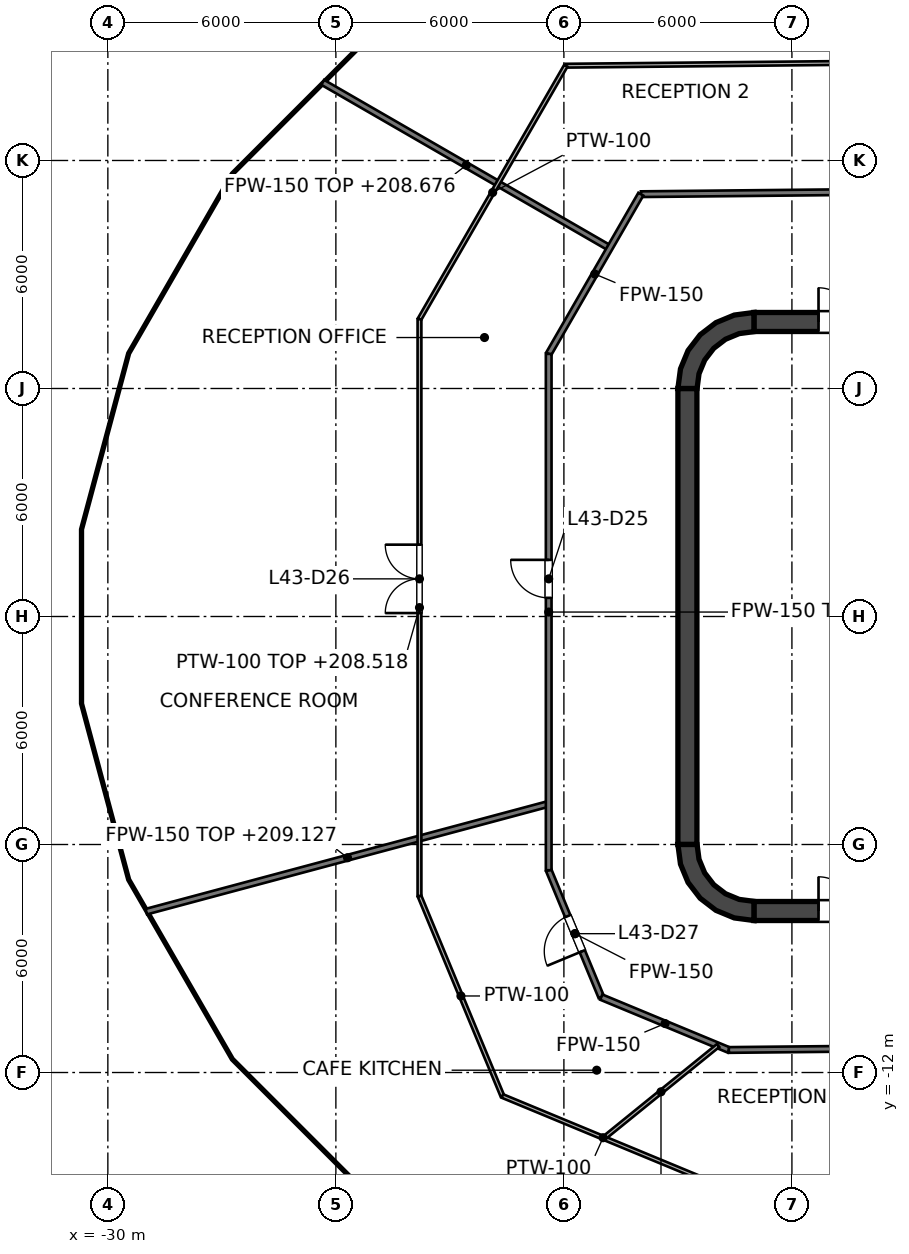
"""IFC4 building model, lengths in metres.
Left out: names, types, materials, properties, quantities, classifications, styles, units other than length and angle.
Written with IfcOpenShell. Run it as: python <this file> out.ifc"""

import sys

from ifc_helpers import new_model, si_unit, direction, frame, frame_2d, origin, place, context, subcontext, project, spatial, polyline, rectangle, outline, extrude, element, fill, save


model = new_model("IFC4")
c1 = context("Model", 3, precision=1e-05, world=origin(), true_north=direction((0.0, 1.0)))
c2 = subcontext(c1, "Body", "Model", "MODEL_VIEW")
j1 = project(units=[si_unit("LENGTHUNIT", "METRE"), si_unit("PLANEANGLEUNIT", "RADIAN")], contexts=[c1])
p1 = place(None, origin())
s1 = spatial("IfcSite", under=j1, at=p1, CompositionType="ELEMENT")
p2 = place(p1, origin())
s2 = spatial("IfcBuilding", under=s1, at=p2, CompositionType="ELEMENT")
p3 = place(p2, frame((0.0, 0.0, 203.0)))
s3 = spatial("IfcBuildingStorey", under=s2, at=p3, CompositionType="ELEMENT", Elevation=203.0)
p4 = place(p3, frame((-13.0, 7.75, 0.0), z_axis=(0.0, 0.0, 1.0), x_axis=(1.0, 0.0, 0.0)))
e1 = element("IfcWall", 1, at=p4, inside=s3, PredefinedType="SHEAR", context=c2, shape_type="SweptSolid", body=[
    extrude(rectangle(XDim=26.0, YDim=0.5, at=frame_2d((13.0, 0.0))), origin(), (0.0, 0.0, 1.0), 6.45),
])
p5 = place(p4, frame((1.7, 0.0, 0.0)))
e2 = element("IfcOpeningElement", 2, at=p5, cuts=e1, PredefinedType="OPENING", context=c2, shape_type="SweptSolid", body=[
    extrude(rectangle(XDim=1.8, YDim=2.1, at=frame_2d((0.9, 1.05))), frame((0.0, 0.25, 0.0), z_axis=(0.0, -1.0, 0.0), x_axis=(1.0, 0.0, 0.0)), (0.0, 0.0, 1.0), 0.5),
])
p6 = place(p4, frame((22.5, 0.0, 0.0)))
e3 = element("IfcOpeningElement", 3, at=p6, cuts=e1, PredefinedType="OPENING", context=c2, shape_type="SweptSolid", body=[
    extrude(rectangle(XDim=1.8, YDim=2.1, at=frame_2d((0.9, 1.05))), frame((0.0, 0.25, 0.0), z_axis=(0.0, -1.0, 0.0), x_axis=(1.0, 0.0, 0.0)), (0.0, 0.0, 1.0), 0.5),
])
p7 = place(p3, frame((-13.0, -7.75, 0.0), z_axis=(0.0, 0.0, 1.0), x_axis=(1.0, 0.0, 0.0)))
e4 = element("IfcWall", 4, at=p7, inside=s3, PredefinedType="SHEAR", context=c2, shape_type="SweptSolid", body=[
    extrude(rectangle(XDim=26.0, YDim=0.5, at=frame_2d((13.0, 0.0))), origin(), (0.0, 0.0, 1.0), 6.45),
])
p8 = place(p7, frame((1.7, 0.0, 0.0)))
e5 = element("IfcOpeningElement", 5, at=p8, cuts=e4, PredefinedType="OPENING", context=c2, shape_type="SweptSolid", body=[
    extrude(rectangle(XDim=1.8, YDim=2.1, at=frame_2d((0.9, 1.05))), frame((0.0, 0.25, 0.0), z_axis=(0.0, -1.0, 0.0), x_axis=(1.0, 0.0, 0.0)), (0.0, 0.0, 1.0), 0.5),
])
p9 = place(p7, frame((22.5, 0.0, 0.0)))
e6 = element("IfcOpeningElement", 6, at=p9, cuts=e4, PredefinedType="OPENING", context=c2, shape_type="SweptSolid", body=[
    extrude(rectangle(XDim=1.8, YDim=2.1, at=frame_2d((0.9, 1.05))), frame((0.0, 0.25, 0.0), z_axis=(0.0, -1.0, 0.0), x_axis=(1.0, 0.0, 0.0)), (0.0, 0.0, 1.0), 0.5),
])
p10 = place(p3, frame((-14.75, -6.0, 0.0), z_axis=(0.0, 0.0, 1.0), x_axis=(0.0, 1.0, 0.0)))
e7 = element("IfcWall", 7, at=p10, inside=s3, PredefinedType="SHEAR", context=c2, shape_type="SweptSolid", body=[
    extrude(rectangle(XDim=12.0, YDim=0.5, at=frame_2d((6.0, 0.0))), origin(), (0.0, 0.0, 1.0), 6.45),
])
p11 = place(p3, origin())
e8 = element("IfcWall", 8, at=p11, inside=s3, PredefinedType="SHEAR", context=c2, shape_type="SweptSolid", body=[
    extrude(outline(polyline([(-15.0, 6.0), (-14.496, 6.0), (-14.445, 6.387), (-14.295, 6.748), (-14.058, 7.058), (-13.748, 7.295), (-13.387, 7.445), (-13.0, 7.496), (-13.0, 8.0), (-13.518, 7.932), (-14.0, 7.732), (-14.414, 7.414), (-14.732, 7.0), (-14.932, 6.518), (-15.0, 6.0)])), origin(), (0.0, 0.0, 1.0), 6.45),
])
e9 = element("IfcWall", 9, at=p11, inside=s3, PredefinedType="SHEAR", context=c2, shape_type="SweptSolid", body=[
    extrude(outline(polyline([(-13.0, -8.0), (-13.0, -7.496), (-13.387, -7.445), (-13.748, -7.295), (-14.058, -7.058), (-14.295, -6.748), (-14.445, -6.387), (-14.496, -6.0), (-15.0, -6.0), (-14.932, -6.518), (-14.732, -7.0), (-14.414, -7.414), (-14.0, -7.732), (-13.518, -7.932), (-13.0, -8.0)])), origin(), (0.0, 0.0, 1.0), 6.45),
])
p12 = place(p3, frame((-11.8, -7.5, 0.0), z_axis=(0.0, 0.0, 1.0), x_axis=(0.0, 1.0, 0.0)))
e10 = element("IfcWall", 10, at=p12, inside=s3, PredefinedType="SOLIDWALL", context=c2, shape_type="SweptSolid", body=[
    extrude(rectangle(XDim=15.0, YDim=0.4, at=frame_2d((7.5, 0.0))), origin(), (0.0, 0.0, 1.0), 5.7),
])
p13 = place(p12, frame((11.3, 0.0, 0.0)))
e11 = element("IfcOpeningElement", 11, at=p13, cuts=e10, PredefinedType="OPENING", context=c2, shape_type="SweptSolid", body=[
    extrude(rectangle(XDim=1.1, YDim=2.1, at=frame_2d((0.55, 1.05))), frame((0.0, 0.2, 0.0), z_axis=(0.0, -1.0, 0.0), x_axis=(1.0, 0.0, 0.0)), (0.0, 0.0, 1.0), 0.4),
])
p14 = place(p12, frame((8.4, 0.0, 0.0)))
e12 = element("IfcOpeningElement", 12, at=p14, cuts=e10, PredefinedType="OPENING", context=c2, shape_type="SweptSolid", body=[
    extrude(rectangle(XDim=1.1, YDim=2.1, at=frame_2d((0.55, 1.05))), frame((0.0, 0.2, 0.0), z_axis=(0.0, -1.0, 0.0), x_axis=(1.0, 0.0, 0.0)), (0.0, 0.0, 1.0), 0.4),
])
p15 = place(p12, frame((5.5, 0.0, 0.0)))
e13 = element("IfcOpeningElement", 13, at=p15, cuts=e10, PredefinedType="OPENING", context=c2, shape_type="SweptSolid", body=[
    extrude(rectangle(XDim=1.1, YDim=2.1, at=frame_2d((0.55, 1.05))), frame((0.0, 0.2, 0.0), z_axis=(0.0, -1.0, 0.0), x_axis=(1.0, 0.0, 0.0)), (0.0, 0.0, 1.0), 0.4),
])
p16 = place(p12, frame((2.6, 0.0, 0.0)))
e14 = element("IfcOpeningElement", 14, at=p16, cuts=e10, PredefinedType="OPENING", context=c2, shape_type="SweptSolid", body=[
    extrude(rectangle(XDim=1.1, YDim=2.1, at=frame_2d((0.55, 1.05))), frame((0.0, 0.2, 0.0), z_axis=(0.0, -1.0, 0.0), x_axis=(1.0, 0.0, 0.0)), (0.0, 0.0, 1.0), 0.4),
])
p17 = place(p12, frame((13.697, 0.0, 0.0)))
e15 = element("IfcOpeningElement", 15, at=p17, cuts=e10, PredefinedType="OPENING", context=c2, shape_type="SweptSolid", body=[
    extrude(rectangle(XDim=0.9, YDim=2.1, at=frame_2d((0.45, 1.05))), frame((0.0, 0.2, 0.0), z_axis=(0.0, -1.0, 0.0), x_axis=(1.0, 0.0, 0.0)), (0.0, 0.0, 1.0), 0.4),
])
p18 = place(p12, frame((0.403, 0.0, 0.0)))
e16 = element("IfcOpeningElement", 16, at=p18, cuts=e10, PredefinedType="OPENING", context=c2, shape_type="SweptSolid", body=[
    extrude(rectangle(XDim=0.9, YDim=2.1, at=frame_2d((0.45, 1.05))), frame((0.0, 0.2, 0.0), z_axis=(0.0, -1.0, 0.0), x_axis=(1.0, 0.0, 0.0)), (0.0, 0.0, 1.0), 0.4),
])
e17 = element("IfcWall", 17, at=p11, inside=s3, PredefinedType="SOLIDWALL", context=c2, shape_type="SweptSolid", body=[
    extrude(outline(polyline([(-12.0, -5.925), (-12.0, -5.675), (-14.25, -5.675), (-14.25, -3.025), (-12.0, -3.025), (-12.0, -2.775), (-14.25, -2.775), (-14.25, -0.125), (-12.0, -0.125), (-12.0, 0.125), (-14.25, 0.125), (-14.25, 2.775), (-12.0, 2.775), (-12.0, 3.025), (-14.25, 3.025), (-14.25, 5.675), (-12.0, 5.675), (-12.0, 5.925), (-14.25, 5.925), (-14.5, 5.925), (-14.5, 5.675), (-14.5, 3.025), (-14.5, 2.775), (-14.5, 0.125), (-14.5, -0.125), (-14.5, -2.775), (-14.5, -3.025), (-14.5, -5.675), (-14.5, -5.925), (-14.25, -5.925), (-12.0, -5.925)])), origin(), (0.0, 0.0, 1.0), 5.7),
])
p19 = place(p3, frame((-18.4, -6.677, 0.0), z_axis=(0.0, 0.0, 1.0), x_axis=(0.382844919445, -0.923812625837, 0.0)))
e18 = element("IfcWall", 18, at=p19, inside=s3, PredefinedType="PARTITIONING", context=c2, shape_type="SweptSolid", body=[
    extrude(rectangle(XDim=3.615, YDim=0.15, at=frame_2d((1.807, 0.0))), origin(), (0.0, 0.0, 1.0), 5.527),
])
p20 = place(p19, frame((1.307, 0.0, 0.0)))
e19 = element("IfcOpeningElement", 19, at=p20, cuts=e18, PredefinedType="OPENING", context=c2, shape_type="SweptSolid", body=[
    extrude(rectangle(XDim=1.0, YDim=2.1, at=frame_2d((0.5, 1.05))), frame((0.0, 0.075, 0.0), z_axis=(0.0, -1.0, 0.0), x_axis=(1.0, 0.0, 0.0)), (0.0, 0.0, 1.0), 0.15),
])
p21 = place(p3, frame((-24.346, 14.056, 0.0), z_axis=(0.0, 0.0, 1.0), x_axis=(0.866019164606, -0.500010806419, 0.0)))
e20 = element("IfcWall", 20, at=p21, inside=s3, PredefinedType="PARTITIONING", context=c2, shape_type="SweptSolid", body=[
    extrude(rectangle(XDim=8.721, YDim=0.15, at=frame_2d((4.361, 0.0))), origin(), (0.0, 0.0, 1.0), 5.676),
])
p22 = place(p3, frame((-17.016, -10.016, 0.0), z_axis=(0.0, 0.0, 1.0), x_axis=(0.923755451027, -0.382982854314, 0.0)))
e21 = element("IfcWall", 21, at=p22, inside=s3, PredefinedType="PARTITIONING", context=c2, shape_type="SweptSolid", body=[
    extrude(rectangle(XDim=3.633, YDim=0.15, at=frame_2d((1.816, 0.0))), origin(), (0.0, 0.0, 1.0), 5.527),
])
p23 = place(p3, frame((-13.66, -11.407, 0.0), z_axis=(0.0, 0.0, 1.0), x_axis=(0.999950890236, 0.009910454857, 0.0)))
e22 = element("IfcWall", 22, at=p23, inside=s3, PredefinedType="PARTITIONING", context=c2, shape_type="SweptSolid", body=[
    extrude(rectangle(XDim=29.635, YDim=0.15, at=frame_2d((14.818, 0.0))), origin(), (0.0, 0.0, 1.0), 5.527),
])
p24 = place(p23, frame((4.817, 0.0, 0.0)))
e23 = element("IfcOpeningElement", 23, at=p24, cuts=e22, PredefinedType="OPENING", context=c2, shape_type="SweptSolid", body=[
    extrude(rectangle(XDim=1.0, YDim=2.1, at=frame_2d((0.5, 1.05))), frame((0.0, 0.075, 0.0), z_axis=(0.0, -1.0, 0.0), x_axis=(1.0, 0.0, 0.0)), (0.0, 0.0, 1.0), 0.15),
])
p25 = place(p23, frame((14.217, 0.0, 0.0)))
e24 = element("IfcOpeningElement", 24, at=p25, cuts=e22, PredefinedType="OPENING", context=c2, shape_type="SweptSolid", body=[
    extrude(rectangle(XDim=1.0, YDim=2.1, at=frame_2d((0.5, 1.05))), frame((0.0, 0.075, 0.0), z_axis=(0.0, -1.0, 0.0), x_axis=(1.0, 0.0, 0.0)), (0.0, 0.0, 1.0), 0.15),
])
p26 = place(p23, frame((19.582, 0.0, 0.0)))
e25 = element("IfcOpeningElement", 25, at=p26, cuts=e22, PredefinedType="OPENING", context=c2, shape_type="SweptSolid", body=[
    extrude(rectangle(XDim=1.0, YDim=2.1, at=frame_2d((0.5, 1.05))), frame((0.0, 0.075, 0.0), z_axis=(0.0, -1.0, 0.0), x_axis=(1.0, 0.0, 0.0)), (0.0, 0.0, 1.0), 0.15),
])
p27 = place(p3, frame((-15.974, 11.113, 0.0), z_axis=(0.0, 0.0, 1.0), x_axis=(0.999950853314, 0.009914179568, 0.0)))
e26 = element("IfcWall", 26, at=p27, inside=s3, PredefinedType="PARTITIONING", context=c2, shape_type="SweptSolid", body=[
    extrude(rectangle(XDim=29.871, YDim=0.15, at=frame_2d((14.935, 0.0))), origin(), (0.0, 0.0, 1.0), 5.527),
])
p28 = place(p27, frame((23.655, 0.0, 0.0)))
e27 = element("IfcOpeningElement", 27, at=p28, cuts=e26, PredefinedType="OPENING", context=c2, shape_type="SweptSolid", body=[
    extrude(rectangle(XDim=1.0, YDim=2.1, at=frame_2d((0.5, 1.05))), frame((0.0, 0.075, 0.0), z_axis=(0.0, -1.0, 0.0), x_axis=(1.0, 0.0, 0.0)), (0.0, 0.0, 1.0), 0.15),
])
p29 = place(p27, frame((16.707, 0.0, 0.0)))
e28 = element("IfcOpeningElement", 28, at=p29, cuts=e26, PredefinedType="OPENING", context=c2, shape_type="SweptSolid", body=[
    extrude(rectangle(XDim=1.0, YDim=2.1, at=frame_2d((0.5, 1.05))), frame((0.0, 0.075, 0.0), z_axis=(0.0, -1.0, 0.0), x_axis=(1.0, 0.0, 0.0)), (0.0, 0.0, 1.0), 0.15),
])
p30 = place(p27, frame((13.027, 0.0, 0.0)))
e29 = element("IfcOpeningElement", 29, at=p30, cuts=e26, PredefinedType="OPENING", context=c2, shape_type="SweptSolid", body=[
    extrude(rectangle(XDim=1.0, YDim=2.1, at=frame_2d((0.5, 1.05))), frame((0.0, 0.075, 0.0), z_axis=(0.0, -1.0, 0.0), x_axis=(1.0, 0.0, 0.0)), (0.0, 0.0, 1.0), 0.15),
])
p31 = place(p27, frame((6.011, 0.0, 0.0)))
e30 = element("IfcOpeningElement", 30, at=p31, cuts=e26, PredefinedType="OPENING", context=c2, shape_type="SweptSolid", body=[
    extrude(rectangle(XDim=1.0, YDim=2.1, at=frame_2d((0.5, 1.05))), frame((0.0, 0.075, 0.0), z_axis=(0.0, -1.0, 0.0), x_axis=(1.0, 0.0, 0.0)), (0.0, 0.0, 1.0), 0.15),
])
p32 = place(p3, frame((-28.988, -7.767, 0.0), z_axis=(0.0, 0.0, 1.0), x_axis=(0.96592965996, 0.258804737225, 0.0)))
e31 = element("IfcWall", 31, at=p32, inside=s3, PredefinedType="PARTITIONING", context=c2, shape_type="SweptSolid", body=[
    extrude(rectangle(XDim=10.962, YDim=0.15, at=frame_2d((5.481, 0.0))), origin(), (0.0, 0.0, 1.0), 6.127),
])
p33 = place(p3, frame((-18.4, 6.911, 0.0), z_axis=(0.0, 0.0, 1.0), x_axis=(0.49981392878, 0.866132805405, 0.0)))
e32 = element("IfcWall", 32, at=p33, inside=s3, PredefinedType="PARTITIONING", context=c2, shape_type="SweptSolid", body=[
    extrude(rectangle(XDim=4.852, YDim=0.15, at=frame_2d((2.426, 0.0))), origin(), (0.0, 0.0, 1.0), 5.527),
])
p34 = place(p3, frame((-18.4, -6.677, 0.0), z_axis=(0.0, 0.0, 1.0), x_axis=(0.0, 1.0, 0.0)))
e33 = element("IfcWall", 33, at=p34, inside=s3, PredefinedType="PARTITIONING", context=c2, shape_type="SweptSolid", body=[
    extrude(rectangle(XDim=13.588, YDim=0.15, at=frame_2d((6.794, 0.0))), origin(), (0.0, 0.0, 1.0), 5.518),
])
p35 = place(p34, frame((7.167, 0.0, 0.0)))
e34 = element("IfcOpeningElement", 34, at=p35, cuts=e33, PredefinedType="OPENING", context=c2, shape_type="SweptSolid", body=[
    extrude(rectangle(XDim=1.0, YDim=2.1, at=frame_2d((0.5, 1.05))), frame((0.0, 0.075, 0.0), z_axis=(0.0, -1.0, 0.0), x_axis=(1.0, 0.0, 0.0)), (0.0, 0.0, 1.0), 0.15),
])
p36 = place(p3, frame((-21.8, -7.354, 0.0), z_axis=(0.0, 0.0, 1.0), x_axis=(0.382944578189, -0.923771319124, 0.0)))
e35 = element("IfcWall", 35, at=p36, inside=s3, PredefinedType="PARTITIONING", context=c2, shape_type="SweptSolid", body=[
    extrude(rectangle(XDim=5.698, YDim=0.1, at=frame_2d((2.849, 0.0))), origin(), (0.0, 0.0, 1.0), 5.527),
])
p37 = place(p3, frame((-19.618, -12.618, 0.0), z_axis=(0.0, 0.0, 1.0), x_axis=(0.923780681685, -0.382921992247, 0.0)))
e36 = element("IfcWall", 36, at=p37, inside=s3, PredefinedType="PARTITIONING", context=c2, shape_type="SweptSolid", body=[
    extrude(rectangle(XDim=5.735, YDim=0.1, at=frame_2d((2.867, 0.0))), origin(), (0.0, 0.0, 1.0), 5.527),
])
p38 = place(p3, frame((-14.32, -14.814, 0.0), z_axis=(0.0, 0.0, 1.0), x_axis=(0.999950809916, 0.009918555737, 0.0)))
e37 = element("IfcWall", 37, at=p38, inside=s3, PredefinedType="PARTITIONING", context=c2, shape_type="SweptSolid", body=[
    extrude(rectangle(XDim=32.27, YDim=0.1, at=frame_2d((16.135, 0.0))), origin(), (0.0, 0.0, 1.0), 5.527),
])
p39 = place(p38, frame((4.239, 0.0, 0.0)))
e38 = element("IfcOpeningElement", 38, at=p39, cuts=e37, PredefinedType="OPENING", context=c2, shape_type="SweptSolid", body=[
    extrude(rectangle(XDim=1.8, YDim=2.1, at=frame_2d((0.9, 1.05))), frame((0.0, 0.05, 0.0), z_axis=(0.0, -1.0, 0.0), x_axis=(1.0, 0.0, 0.0)), (0.0, 0.0, 1.0), 0.1),
])
p40 = place(p38, frame((21.845, 0.0, 0.0)))
e39 = element("IfcOpeningElement", 39, at=p40, cuts=e37, PredefinedType="OPENING", context=c2, shape_type="SweptSolid", body=[
    extrude(rectangle(XDim=1.8, YDim=2.1, at=frame_2d((0.9, 1.05))), frame((0.0, 0.05, 0.0), z_axis=(0.0, -1.0, 0.0), x_axis=(1.0, 0.0, 0.0)), (0.0, 0.0, 1.0), 0.1),
])
p41 = place(p3, frame((-17.948, 14.494, 0.0), z_axis=(0.0, 0.0, 1.0), x_axis=(0.999950742898, 0.009925309958, 0.0)))
e40 = element("IfcWall", 40, at=p41, inside=s3, PredefinedType="PARTITIONING", context=c2, shape_type="SweptSolid", body=[
    extrude(rectangle(XDim=32.74, YDim=0.1, at=frame_2d((16.37, 0.0))), origin(), (0.0, 0.0, 1.0), 5.527),
])
p42 = place(p41, frame((25.996, 0.0, 0.0)))
e41 = element("IfcOpeningElement", 41, at=p42, cuts=e40, PredefinedType="OPENING", context=c2, shape_type="SweptSolid", body=[
    extrude(rectangle(XDim=1.8, YDim=2.1, at=frame_2d((0.9, 1.05))), frame((0.0, 0.05, 0.0), z_axis=(0.0, -1.0, 0.0), x_axis=(1.0, 0.0, 0.0)), (0.0, 0.0, 1.0), 0.1),
])
p43 = place(p41, frame((8.024, 0.0, 0.0)))
e42 = element("IfcOpeningElement", 42, at=p43, cuts=e40, PredefinedType="OPENING", context=c2, shape_type="SweptSolid", body=[
    extrude(rectangle(XDim=1.8, YDim=2.1, at=frame_2d((0.9, 1.05))), frame((0.0, 0.05, 0.0), z_axis=(0.0, -1.0, 0.0), x_axis=(1.0, 0.0, 0.0)), (0.0, 0.0, 1.0), 0.1),
])
p44 = place(p3, frame((-16.948, -13.725, 0.0), z_axis=(0.0, 0.0, 1.0), x_axis=(0.777049371159, 0.629439651421, 0.0)))
e43 = element("IfcWall", 43, at=p44, inside=s3, PredefinedType="PARTITIONING", context=c2, shape_type="SweptSolid", body=[
    extrude(rectangle(XDim=3.869, YDim=0.1, at=frame_2d((1.934, 0.0))), origin(), (0.0, 0.0, 1.0), 5.7),
])
p45 = place(p3, frame((-21.8, 7.822, 0.0), z_axis=(0.0, 0.0, 1.0), x_axis=(0.499942825872, 0.866058410766, 0.0)))
e44 = element("IfcWall", 44, at=p45, inside=s3, PredefinedType="PARTITIONING", context=c2, shape_type="SweptSolid", body=[
    extrude(rectangle(XDim=7.704, YDim=0.1, at=frame_2d((3.852, 0.0))), origin(), (0.0, 0.0, 1.0), 5.527),
])
p46 = place(p3, frame((-21.8, -7.354, 0.0), z_axis=(0.0, 0.0, 1.0), x_axis=(0.0, 1.0, 0.0)))
e45 = element("IfcWall", 45, at=p46, inside=s3, PredefinedType="PARTITIONING", context=c2, shape_type="SweptSolid", body=[
    extrude(rectangle(XDim=15.176, YDim=0.1, at=frame_2d((7.588, 0.0))), origin(), (0.0, 0.0, 1.0), 5.518),
])
p47 = place(p46, frame((7.445, 0.0, 0.0)))
e46 = element("IfcOpeningElement", 46, at=p47, cuts=e45, PredefinedType="OPENING", context=c2, shape_type="SweptSolid", body=[
    extrude(rectangle(XDim=1.8, YDim=2.1, at=frame_2d((0.9, 1.05))), frame((0.0, 0.05, 0.0), z_axis=(0.0, -1.0, 0.0), x_axis=(1.0, 0.0, 0.0)), (0.0, 0.0, 1.0), 0.1),
])
p48 = place(p13, origin())
e47 = element("IfcDoor", 47, at=p48, inside=s3, OperationType="DOUBLE_DOOR_SLIDING", PredefinedType="DOOR", context=c2, shape_type="SweptSolid", body=[
    extrude(rectangle(XDim=1.1, YDim=2.1, at=frame_2d((0.55, 1.05))), frame((0.0, 0.025, 0.0), z_axis=(0.0, -1.0, 0.0), x_axis=(1.0, 0.0, 0.0)), (0.0, 0.0, 1.0), 0.05),
])
fill(e11, e47)
p49 = place(p14, origin())
e48 = element("IfcDoor", 48, at=p49, inside=s3, OperationType="DOUBLE_DOOR_SLIDING", PredefinedType="DOOR", context=c2, shape_type="SweptSolid", body=[
    extrude(rectangle(XDim=1.1, YDim=2.1, at=frame_2d((0.55, 1.05))), frame((0.0, 0.025, 0.0), z_axis=(0.0, -1.0, 0.0), x_axis=(1.0, 0.0, 0.0)), (0.0, 0.0, 1.0), 0.05),
])
fill(e12, e48)
p50 = place(p15, origin())
e49 = element("IfcDoor", 49, at=p50, inside=s3, OperationType="DOUBLE_DOOR_SLIDING", PredefinedType="DOOR", context=c2, shape_type="SweptSolid", body=[
    extrude(rectangle(XDim=1.1, YDim=2.1, at=frame_2d((0.55, 1.05))), frame((0.0, 0.025, 0.0), z_axis=(0.0, -1.0, 0.0), x_axis=(1.0, 0.0, 0.0)), (0.0, 0.0, 1.0), 0.05),
])
fill(e13, e49)
p51 = place(p16, origin())
e50 = element("IfcDoor", 50, at=p51, inside=s3, OperationType="DOUBLE_DOOR_SLIDING", PredefinedType="DOOR", context=c2, shape_type="SweptSolid", body=[
    extrude(rectangle(XDim=1.1, YDim=2.1, at=frame_2d((0.55, 1.05))), frame((0.0, 0.025, 0.0), z_axis=(0.0, -1.0, 0.0), x_axis=(1.0, 0.0, 0.0)), (0.0, 0.0, 1.0), 0.05),
])
fill(e14, e50)
p52 = place(p17, origin())
e51 = element("IfcDoor", 51, at=p52, inside=s3, OperationType="SINGLE_SWING_LEFT", PredefinedType="DOOR", context=c2, shape_type="SweptSolid", body=[
    extrude(rectangle(XDim=0.9, YDim=2.1, at=frame_2d((0.45, 1.05))), frame((0.0, 0.025, 0.0), z_axis=(0.0, -1.0, 0.0), x_axis=(1.0, 0.0, 0.0)), (0.0, 0.0, 1.0), 0.05),
])
fill(e15, e51)
p53 = place(p18, origin())
e52 = element("IfcDoor", 52, at=p53, inside=s3, OperationType="SINGLE_SWING_LEFT", PredefinedType="DOOR", context=c2, shape_type="SweptSolid", body=[
    extrude(rectangle(XDim=0.9, YDim=2.1, at=frame_2d((0.45, 1.05))), frame((0.0, 0.025, 0.0), z_axis=(0.0, -1.0, 0.0), x_axis=(1.0, 0.0, 0.0)), (0.0, 0.0, 1.0), 0.05),
])
fill(e16, e52)
p54 = place(p5, origin())
e53 = element("IfcDoor", 53, at=p54, inside=s3, OperationType="DOUBLE_DOOR_SINGLE_SWING", PredefinedType="DOOR", context=c2, shape_type="SweptSolid", body=[
    extrude(rectangle(XDim=1.8, YDim=2.1, at=frame_2d((0.9, 1.05))), frame((0.0, 0.025, 0.0), z_axis=(0.0, -1.0, 0.0), x_axis=(1.0, 0.0, 0.0)), (0.0, 0.0, 1.0), 0.05),
])
fill(e2, e53)
p55 = place(p8, origin())
e54 = element("IfcDoor", 54, at=p55, inside=s3, OperationType="DOUBLE_DOOR_SINGLE_SWING", PredefinedType="DOOR", context=c2, shape_type="SweptSolid", body=[
    extrude(rectangle(XDim=1.8, YDim=2.1, at=frame_2d((0.9, 1.05))), frame((0.0, 0.025, 0.0), z_axis=(0.0, -1.0, 0.0), x_axis=(1.0, 0.0, 0.0)), (0.0, 0.0, 1.0), 0.05),
])
fill(e5, e54)
p56 = place(p35, origin())
e55 = element("IfcDoor", 55, at=p56, inside=s3, OperationType="SINGLE_SWING_RIGHT", PredefinedType="DOOR", context=c2, shape_type="SweptSolid", body=[
    extrude(rectangle(XDim=1.0, YDim=2.1, at=frame_2d((0.5, 1.05))), frame((0.0, 0.025, 0.0), z_axis=(0.0, -1.0, 0.0), x_axis=(1.0, 0.0, 0.0)), (0.0, 0.0, 1.0), 0.05),
])
fill(e34, e55)
p57 = place(p47, origin())
e56 = element("IfcDoor", 56, at=p57, inside=s3, OperationType="DOUBLE_DOOR_SINGLE_SWING", PredefinedType="DOOR", context=c2, shape_type="SweptSolid", body=[
    extrude(rectangle(XDim=1.8, YDim=2.1, at=frame_2d((0.9, 1.05))), frame((0.0, 0.025, 0.0), z_axis=(0.0, -1.0, 0.0), x_axis=(1.0, 0.0, 0.0)), (0.0, 0.0, 1.0), 0.05),
])
fill(e46, e56)
p58 = place(p20, origin())
e57 = element("IfcDoor", 57, at=p58, inside=s3, OperationType="SINGLE_SWING_RIGHT", PredefinedType="DOOR", context=c2, shape_type="SweptSolid", body=[
    extrude(rectangle(XDim=1.0, YDim=2.1, at=frame_2d((0.5, 1.05))), frame((0.0, 0.025, 0.0), z_axis=(0.0, -1.0, 0.0), x_axis=(1.0, 0.0, 0.0)), (0.0, 0.0, 1.0), 0.05),
])
fill(e19, e57)
save(model, sys.argv[1])
